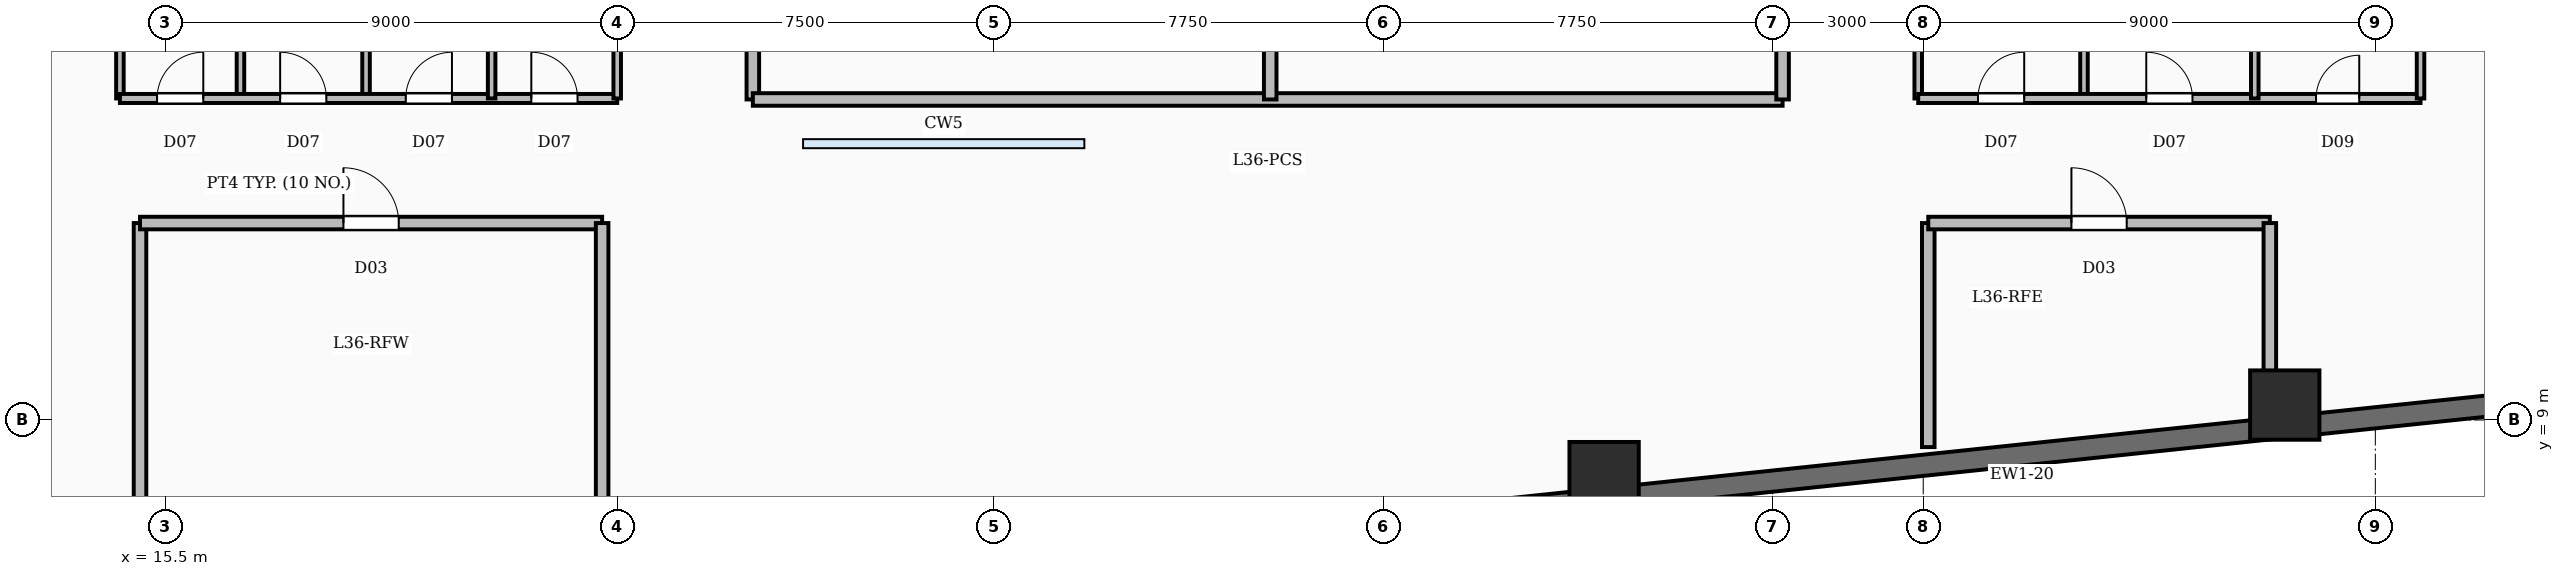
"""IFC4 building model, lengths in metres.
Left out: names, types, materials, properties, quantities, classifications, styles, units other than length and angle.
Written with IfcOpenShell. Run it as: python <this file> out.ifc"""

import sys

from ifc_helpers import new_model, si_unit, direction, frame, frame_2d, origin, origin_2d, place, context, subcontext, project, spatial, rectangle, circle, extrude, element, fill, save


model = new_model("IFC4")
c1 = context("Model", 3, precision=1e-05, world=origin(), true_north=direction((0.0, 1.0)))
c2 = subcontext(c1, "Body", "Model", "MODEL_VIEW")
j1 = project(units=[si_unit("LENGTHUNIT", "METRE"), si_unit("PLANEANGLEUNIT", "RADIAN")], contexts=[c1])
p1 = place(None, origin())
s1 = spatial("IfcSite", under=j1, at=p1, CompositionType="ELEMENT")
p2 = place(p1, origin())
s2 = spatial("IfcBuilding", under=s1, at=p2, CompositionType="ELEMENT")
p3 = place(p2, frame((0.0, 0.0, 153.25)))
s3 = spatial("IfcBuildingStorey", under=s2, at=p3, CompositionType="ELEMENT", Elevation=153.25)
p4 = place(p3, frame((44.147, 7.873, 0.238), z_axis=(-0.90500253685, -0.147281901162, 0.399097043193), x_axis=(0.160628754411, -0.987014895154, 0.0)))
e1 = element("IfcColumn", 1, at=p4, inside=s3, PredefinedType="COLUMN", context=c2, shape_type="SweptSolid", body=[
    extrude(circle(Radius=0.69, at=origin_2d()), origin(), (0.0, 0.0, 1.0), 9.657),
])
p5 = place(p3, frame((57.697, 9.297, 0.261), z_axis=(-0.902829229736, -0.263523113975, 0.339786624716), x_axis=(0.280193938349, -0.959943413391, 0.0)))
e2 = element("IfcColumn", 2, at=p5, inside=s3, PredefinedType="COLUMN", context=c2, shape_type="SweptSolid", body=[
    extrude(circle(Radius=0.69, at=origin_2d()), origin(), (0.0, 0.0, 1.0), 11.205),
])
p6 = place(p3, frame((71.247, 10.721, 0.278), z_axis=(-0.890866147658, -0.347553061876, 0.292513890502), x_axis=(0.363449897409, -0.931613746181, 0.0)))
e3 = element("IfcColumn", 3, at=p6, inside=s3, PredefinedType="COLUMN", context=c2, shape_type="SweptSolid", body=[
    extrude(circle(Radius=0.69, at=origin_2d()), origin(), (0.0, 0.0, 1.0), 12.899),
])
p7 = place(p3, frame((13.212, 6.021, 0.172), z_axis=(-0.793355795924, 0.28018707572, 0.540445911886), x_axis=(-0.333009447502, -0.942923489937, 0.0)))
e4 = element("IfcColumn", 4, at=p7, inside=s3, PredefinedType="COLUMN", context=c2, shape_type="SweptSolid", body=[
    extrude(circle(Radius=0.69, at=origin_2d()), origin(), (0.0, 0.0, 1.0), 7.375),
])
p8 = place(p3, frame((71.641, 10.32, 0.0), z_axis=(0.0, 0.0, 1.0), x_axis=(-0.994521775062, -0.104529607897, 0.0)))
e5 = element("IfcWall", 5, at=p8, inside=s3, PredefinedType="SOLIDWALL", context=c2, shape_type="SweptSolid", body=[
    extrude(rectangle(XDim=55.2, YDim=0.42, at=frame_2d((27.6, 0.0))), origin(), (0.0, 0.0, 1.0), 4.75),
])
for number, where, z_axis, x_axis in (
    (6, (17.0, 15.4, 0.0), (0.0, 0.0, 1.0), (0.0, 1.0, 0.0)),
    (7, (19.5, 15.4, 0.0), (0.0, 0.0, 1.0), (0.0, 1.0, 0.0)),
    (8, (22.0, 15.4, 0.0), (0.0, 0.0, 1.0), (0.0, 1.0, 0.0)),
):
    element("IfcWall", number, at=place(p3, frame(where, z_axis=z_axis, x_axis=x_axis)), inside=s3, PredefinedType="PARTITIONING", context=c2, shape_type="SweptSolid", body=[
        extrude(rectangle(XDim=3.58, YDim=0.15, at=frame_2d((1.79, 0.0))), origin(), (0.0, 0.0, 1.0), 3.81),
    ])
p9 = place(p3, frame((14.6, 15.4, 0.0), z_axis=(0.0, 0.0, 1.0), x_axis=(1.0, 0.0, 0.0)))
e9 = element("IfcWall", 9, at=p9, inside=s3, PredefinedType="PARTITIONING", context=c2, shape_type="SweptSolid", body=[
    extrude(rectangle(XDim=9.9, YDim=0.18, at=frame_2d((4.95, 0.0))), origin(), (0.0, 0.0, 1.0), 3.81),
])
p10 = place(p9, frame((0.74, 0.0, 0.0)))
e10 = element("IfcOpeningElement", 10, at=p10, cuts=e9, PredefinedType="OPENING", context=c2, shape_type="SweptSolid", body=[
    extrude(rectangle(XDim=0.92, YDim=2.1, at=frame_2d((0.46, 1.05))), frame((0.0, 0.1, 0.0), z_axis=(0.0, -1.0, 0.0), x_axis=(1.0, 0.0, 0.0)), (0.0, 0.0, 1.0), 0.2),
])
p11 = place(p9, frame((3.19, 0.0, 0.0)))
e11 = element("IfcOpeningElement", 11, at=p11, cuts=e9, PredefinedType="OPENING", context=c2, shape_type="SweptSolid", body=[
    extrude(rectangle(XDim=0.92, YDim=2.1, at=frame_2d((0.46, 1.05))), frame((0.0, 0.1, 0.0), z_axis=(0.0, -1.0, 0.0), x_axis=(1.0, 0.0, 0.0)), (0.0, 0.0, 1.0), 0.2),
])
p12 = place(p9, frame((5.69, 0.0, 0.0)))
e12 = element("IfcOpeningElement", 12, at=p12, cuts=e9, PredefinedType="OPENING", context=c2, shape_type="SweptSolid", body=[
    extrude(rectangle(XDim=0.92, YDim=2.1, at=frame_2d((0.46, 1.05))), frame((0.0, 0.1, 0.0), z_axis=(0.0, -1.0, 0.0), x_axis=(1.0, 0.0, 0.0)), (0.0, 0.0, 1.0), 0.2),
])
p13 = place(p9, frame((8.19, 0.0, 0.0)))
e13 = element("IfcOpeningElement", 13, at=p13, cuts=e9, PredefinedType="OPENING", context=c2, shape_type="SweptSolid", body=[
    extrude(rectangle(XDim=0.92, YDim=2.1, at=frame_2d((0.46, 1.05))), frame((0.0, 0.1, 0.0), z_axis=(0.0, -1.0, 0.0), x_axis=(1.0, 0.0, 0.0)), (0.0, 0.0, 1.0), 0.2),
])
for number, where, z_axis, x_axis in (
    (14, (14.6, 15.4, 0.0), (0.0, 0.0, 1.0), (0.0, 1.0, 0.0)),
    (15, (24.5, 15.4, 0.0), (0.0, 0.0, 1.0), (0.0, 1.0, 0.0)),
):
    element("IfcWall", number, at=place(p3, frame(where, z_axis=z_axis, x_axis=x_axis)), inside=s3, PredefinedType="PARTITIONING", context=c2, shape_type="SweptSolid", body=[
        extrude(rectangle(XDim=3.58, YDim=0.15, at=frame_2d((1.79, 0.0))), origin(), (0.0, 0.0, 1.0), 2.8),
    ])
for number, where, z_axis, x_axis in (
    (16, (53.7, 15.4, 0.0), (0.0, 0.0, 1.0), (0.0, 1.0, 0.0)),
    (17, (57.1, 15.4, 0.0), (0.0, 0.0, 1.0), (0.0, 1.0, 0.0)),
):
    element("IfcWall", number, at=place(p3, frame(where, z_axis=z_axis, x_axis=x_axis)), inside=s3, PredefinedType="PARTITIONING", context=c2, shape_type="SweptSolid", body=[
        extrude(rectangle(XDim=3.58, YDim=0.15, at=frame_2d((1.79, 0.0))), origin(), (0.0, 0.0, 1.0), 3.81),
    ])
p14 = place(p3, frame((50.4, 15.4, 0.0), z_axis=(0.0, 0.0, 1.0), x_axis=(1.0, 0.0, 0.0)))
e18 = element("IfcWall", 18, at=p14, inside=s3, PredefinedType="SOLIDWALL", context=c2, shape_type="SweptSolid", body=[
    extrude(rectangle(XDim=10.0, YDim=0.18, at=frame_2d((5.0, 0.0))), origin(), (0.0, 0.0, 1.0), 3.81),
])
p15 = place(p14, frame((1.19, 0.0, 0.0)))
e19 = element("IfcOpeningElement", 19, at=p15, cuts=e18, PredefinedType="OPENING", context=c2, shape_type="SweptSolid", body=[
    extrude(rectangle(XDim=0.92, YDim=2.1, at=frame_2d((0.46, 1.05))), frame((0.0, 0.1, 0.0), z_axis=(0.0, -1.0, 0.0), x_axis=(1.0, 0.0, 0.0)), (0.0, 0.0, 1.0), 0.2),
])
p16 = place(p14, frame((4.54, 0.0, 0.0)))
e20 = element("IfcOpeningElement", 20, at=p16, cuts=e18, PredefinedType="OPENING", context=c2, shape_type="SweptSolid", body=[
    extrude(rectangle(XDim=0.92, YDim=2.1, at=frame_2d((0.46, 1.05))), frame((0.0, 0.1, 0.0), z_axis=(0.0, -1.0, 0.0), x_axis=(1.0, 0.0, 0.0)), (0.0, 0.0, 1.0), 0.2),
])
p17 = place(p14, frame((7.92, 0.0, 0.0)))
e21 = element("IfcOpeningElement", 21, at=p17, cuts=e18, PredefinedType="OPENING", context=c2, shape_type="SweptSolid", body=[
    extrude(rectangle(XDim=0.86, YDim=2.05, at=frame_2d((0.43, 1.025))), frame((0.0, 0.1, 0.0), z_axis=(0.0, -1.0, 0.0), x_axis=(1.0, 0.0, 0.0)), (0.0, 0.0, 1.0), 0.2),
])
for number, where, z_axis, x_axis in (
    (22, (50.4, 15.4, 0.0), (0.0, 0.0, 1.0), (0.0, 1.0, 0.0)),
    (23, (60.4, 15.4, 0.0), (0.0, 0.0, 1.0), (0.0, 1.0, 0.0)),
):
    element("IfcWall", number, at=place(p3, frame(where, z_axis=z_axis, x_axis=x_axis)), inside=s3, PredefinedType="PARTITIONING", context=c2, shape_type="SweptSolid", body=[
        extrude(rectangle(XDim=3.58, YDim=0.15, at=frame_2d((1.79, 0.0))), origin(), (0.0, 0.0, 1.0), 2.8),
    ])
p18 = place(p3, frame((37.5, 15.38, 0.0), z_axis=(0.0, 0.0, 1.0), x_axis=(0.0, 1.0, 0.0)))
e24 = element("IfcWall", 24, at=p18, inside=s3, PredefinedType="SOLIDWALL", context=c2, shape_type="SweptSolid", body=[
    extrude(rectangle(XDim=20.84, YDim=0.25, at=frame_2d((10.42, 0.0))), origin(), (0.0, 0.0, 1.0), 3.81),
])
p19 = place(p3, frame((27.2, 15.38, 0.0), z_axis=(0.0, 0.0, 1.0), x_axis=(1.0, 0.0, 0.0)))
e25 = element("IfcWall", 25, at=p19, inside=s3, PredefinedType="SOLIDWALL", context=c2, shape_type="SweptSolid", body=[
    extrude(rectangle(XDim=20.5, YDim=0.25, at=frame_2d((10.25, 0.0))), origin(), (0.0, 0.0, 1.0), 3.81),
])
p20 = place(p3, frame((27.2, 15.38, 0.0), z_axis=(0.0, 0.0, 1.0), x_axis=(0.0, 1.0, 0.0)))
e26 = element("IfcWall", 26, at=p20, inside=s3, PredefinedType="SOLIDWALL", context=c2, shape_type="SweptSolid", body=[
    extrude(rectangle(XDim=20.84, YDim=0.25, at=frame_2d((10.42, 0.0))), origin(), (0.0, 0.0, 1.0), 3.81),
])
p21 = place(p20, frame((4.8, 0.0, 0.0)))
e27 = element("IfcOpeningElement", 27, at=p21, cuts=e26, PredefinedType="OPENING", context=c2, shape_type="SweptSolid", body=[
    extrude(rectangle(XDim=1.2, YDim=2.2, at=frame_2d((0.6, 1.1))), frame((0.0, 0.135, 0.0), z_axis=(0.0, -1.0, 0.0), x_axis=(1.0, 0.0, 0.0)), (0.0, 0.0, 1.0), 0.27),
])
p22 = place(p20, frame((14.5, 0.0, 0.0)))
e28 = element("IfcOpeningElement", 28, at=p22, cuts=e26, PredefinedType="OPENING", context=c2, shape_type="SweptSolid", body=[
    extrude(rectangle(XDim=1.2, YDim=2.2, at=frame_2d((0.6, 1.1))), frame((0.0, 0.135, 0.0), z_axis=(0.0, -1.0, 0.0), x_axis=(1.0, 0.0, 0.0)), (0.0, 0.0, 1.0), 0.27),
])
p23 = place(p3, frame((47.7, 15.38, 0.0), z_axis=(0.0, 0.0, 1.0), x_axis=(0.0, 1.0, 0.0)))
e29 = element("IfcWall", 29, at=p23, inside=s3, PredefinedType="SOLIDWALL", context=c2, shape_type="SweptSolid", body=[
    extrude(rectangle(XDim=20.84, YDim=0.25, at=frame_2d((10.42, 0.0))), origin(), (0.0, 0.0, 1.0), 3.81),
])
p24 = place(p23, frame((4.8, 0.0, 0.0)))
e30 = element("IfcOpeningElement", 30, at=p24, cuts=e29, PredefinedType="OPENING", context=c2, shape_type="SweptSolid", body=[
    extrude(rectangle(XDim=1.2, YDim=2.2, at=frame_2d((0.6, 1.1))), frame((0.0, 0.135, 0.0), z_axis=(0.0, -1.0, 0.0), x_axis=(1.0, 0.0, 0.0)), (0.0, 0.0, 1.0), 0.27),
])
p25 = place(p23, frame((14.5, 0.0, 0.0)))
e31 = element("IfcOpeningElement", 31, at=p25, cuts=e29, PredefinedType="OPENING", context=c2, shape_type="SweptSolid", body=[
    extrude(rectangle(XDim=1.2, YDim=2.2, at=frame_2d((0.6, 1.1))), frame((0.0, 0.135, 0.0), z_axis=(0.0, -1.0, 0.0), x_axis=(1.0, 0.0, 0.0)), (0.0, 0.0, 1.0), 0.27),
])
p26 = place(p3, frame((15.0, 12.92, 0.0), z_axis=(0.0, 0.0, 1.0), x_axis=(1.0, 0.0, 0.0)))
e32 = element("IfcWall", 32, at=p26, inside=s3, PredefinedType="SOLIDWALL", context=c2, shape_type="SweptSolid", body=[
    extrude(rectangle(XDim=9.2, YDim=0.25, at=frame_2d((4.6, 0.0))), origin(), (0.0, 0.0, 1.0), 3.81),
])
p27 = place(p26, frame((4.05, 0.0, 0.0)))
e33 = element("IfcOpeningElement", 33, at=p27, cuts=e32, PredefinedType="OPENING", context=c2, shape_type="SweptSolid", body=[
    extrude(rectangle(XDim=1.1, YDim=2.15, at=frame_2d((0.55, 1.075))), frame((0.0, 0.135, 0.0), z_axis=(0.0, -1.0, 0.0), x_axis=(1.0, 0.0, 0.0)), (0.0, 0.0, 1.0), 0.27),
])
p28 = place(p3, frame((15.0, 5.066, 0.0), z_axis=(0.0, 0.0, 1.0), x_axis=(0.0, 1.0, 0.0)))
e34 = element("IfcWall", 34, at=p28, inside=s3, PredefinedType="SOLIDWALL", context=c2, shape_type="SweptSolid", body=[
    extrude(rectangle(XDim=7.854, YDim=0.25, at=frame_2d((3.927, 0.0))), origin(), (0.0, 0.0, 1.0), 3.81),
])
p29 = place(p3, frame((24.2, 5.686, 0.0), z_axis=(0.0, 0.0, 1.0), x_axis=(0.0, 1.0, 0.0)))
e35 = element("IfcWall", 35, at=p29, inside=s3, PredefinedType="SOLIDWALL", context=c2, shape_type="SweptSolid", body=[
    extrude(rectangle(XDim=7.234, YDim=0.25, at=frame_2d((3.617, 0.0))), origin(), (0.0, 0.0, 1.0), 2.8),
])
p30 = place(p3, frame((50.6, 12.92, 0.0), z_axis=(0.0, 0.0, 1.0), x_axis=(1.0, 0.0, 0.0)))
e36 = element("IfcWall", 36, at=p30, inside=s3, PredefinedType="SOLIDWALL", context=c2, shape_type="SweptSolid", body=[
    extrude(rectangle(XDim=6.8, YDim=0.25, at=frame_2d((3.4, 0.0))), origin(), (0.0, 0.0, 1.0), 3.81),
])
p31 = place(p30, frame((2.85, 0.0, 0.0)))
e37 = element("IfcOpeningElement", 37, at=p31, cuts=e36, PredefinedType="OPENING", context=c2, shape_type="SweptSolid", body=[
    extrude(rectangle(XDim=1.1, YDim=2.15, at=frame_2d((0.55, 1.075))), frame((0.0, 0.135, 0.0), z_axis=(0.0, -1.0, 0.0), x_axis=(1.0, 0.0, 0.0)), (0.0, 0.0, 1.0), 0.27),
])
p32 = place(p3, frame((50.6, 8.461, 0.0), z_axis=(0.0, 0.0, 1.0), x_axis=(0.0, 1.0, 0.0)))
e38 = element("IfcWall", 38, at=p32, inside=s3, PredefinedType="SOLIDWALL", context=c2, shape_type="SweptSolid", body=[
    extrude(rectangle(XDim=4.459, YDim=0.25, at=frame_2d((2.229, 0.0))), origin(), (0.0, 0.0, 1.0), 3.81),
])
p33 = place(p3, frame((57.4, 9.176, 0.0), z_axis=(0.0, 0.0, 1.0), x_axis=(0.0, 1.0, 0.0)))
e39 = element("IfcWall", 39, at=p33, inside=s3, PredefinedType="SOLIDWALL", context=c2, shape_type="SweptSolid", body=[
    extrude(rectangle(XDim=3.744, YDim=0.25, at=frame_2d((1.872, 0.0))), origin(), (0.0, 0.0, 1.0), 3.81),
])
p34 = place(p10, origin())
e40 = element("IfcDoor", 40, at=p34, inside=s3, OperationType="SINGLE_SWING_RIGHT", PredefinedType="DOOR", context=c2, shape_type="SweptSolid", body=[
    extrude(rectangle(XDim=0.92, YDim=2.1, at=frame_2d((0.46, 1.05))), frame((0.0, 0.025, 0.0), z_axis=(0.0, -1.0, 0.0), x_axis=(1.0, 0.0, 0.0)), (0.0, 0.0, 1.0), 0.05),
])
fill(e10, e40)
p35 = place(p11, origin())
e41 = element("IfcDoor", 41, at=p35, inside=s3, OperationType="SINGLE_SWING_LEFT", PredefinedType="DOOR", context=c2, shape_type="SweptSolid", body=[
    extrude(rectangle(XDim=0.92, YDim=2.1, at=frame_2d((0.46, 1.05))), frame((0.0, 0.025, 0.0), z_axis=(0.0, -1.0, 0.0), x_axis=(1.0, 0.0, 0.0)), (0.0, 0.0, 1.0), 0.05),
])
fill(e11, e41)
p36 = place(p12, origin())
e42 = element("IfcDoor", 42, at=p36, inside=s3, OperationType="SINGLE_SWING_RIGHT", PredefinedType="DOOR", context=c2, shape_type="SweptSolid", body=[
    extrude(rectangle(XDim=0.92, YDim=2.1, at=frame_2d((0.46, 1.05))), frame((0.0, 0.025, 0.0), z_axis=(0.0, -1.0, 0.0), x_axis=(1.0, 0.0, 0.0)), (0.0, 0.0, 1.0), 0.05),
])
fill(e12, e42)
p37 = place(p13, origin())
e43 = element("IfcDoor", 43, at=p37, inside=s3, OperationType="SINGLE_SWING_LEFT", PredefinedType="DOOR", context=c2, shape_type="SweptSolid", body=[
    extrude(rectangle(XDim=0.92, YDim=2.1, at=frame_2d((0.46, 1.05))), frame((0.0, 0.025, 0.0), z_axis=(0.0, -1.0, 0.0), x_axis=(1.0, 0.0, 0.0)), (0.0, 0.0, 1.0), 0.05),
])
fill(e13, e43)
p38 = place(p15, origin())
e44 = element("IfcDoor", 44, at=p38, inside=s3, OperationType="SINGLE_SWING_RIGHT", PredefinedType="DOOR", context=c2, shape_type="SweptSolid", body=[
    extrude(rectangle(XDim=0.92, YDim=2.1, at=frame_2d((0.46, 1.05))), frame((0.0, 0.025, 0.0), z_axis=(0.0, -1.0, 0.0), x_axis=(1.0, 0.0, 0.0)), (0.0, 0.0, 1.0), 0.05),
])
fill(e19, e44)
p39 = place(p16, origin())
e45 = element("IfcDoor", 45, at=p39, inside=s3, OperationType="SINGLE_SWING_LEFT", PredefinedType="DOOR", context=c2, shape_type="SweptSolid", body=[
    extrude(rectangle(XDim=0.92, YDim=2.1, at=frame_2d((0.46, 1.05))), frame((0.0, 0.025, 0.0), z_axis=(0.0, -1.0, 0.0), x_axis=(1.0, 0.0, 0.0)), (0.0, 0.0, 1.0), 0.05),
])
fill(e20, e45)
p40 = place(p17, origin())
e46 = element("IfcDoor", 46, at=p40, inside=s3, OperationType="SINGLE_SWING_RIGHT", PredefinedType="DOOR", context=c2, shape_type="SweptSolid", body=[
    extrude(rectangle(XDim=0.86, YDim=2.05, at=frame_2d((0.43, 1.025))), frame((0.0, 0.025, 0.0), z_axis=(0.0, -1.0, 0.0), x_axis=(1.0, 0.0, 0.0)), (0.0, 0.0, 1.0), 0.05),
])
fill(e21, e46)
p41 = place(p27, origin())
e47 = element("IfcDoor", 47, at=p41, inside=s3, OperationType="SINGLE_SWING_LEFT", PredefinedType="DOOR", context=c2, shape_type="SweptSolid", body=[
    extrude(rectangle(XDim=1.1, YDim=2.15, at=frame_2d((0.55, 1.075))), frame((0.0, 0.025, 0.0), z_axis=(0.0, -1.0, 0.0), x_axis=(1.0, 0.0, 0.0)), (0.0, 0.0, 1.0), 0.05),
])
fill(e33, e47)
p42 = place(p31, origin())
e48 = element("IfcDoor", 48, at=p42, inside=s3, OperationType="SINGLE_SWING_LEFT", PredefinedType="DOOR", context=c2, shape_type="SweptSolid", body=[
    extrude(rectangle(XDim=1.1, YDim=2.15, at=frame_2d((0.55, 1.075))), frame((0.0, 0.025, 0.0), z_axis=(0.0, -1.0, 0.0), x_axis=(1.0, 0.0, 0.0)), (0.0, 0.0, 1.0), 0.05),
])
fill(e37, e48)
save(model, sys.argv[1])
